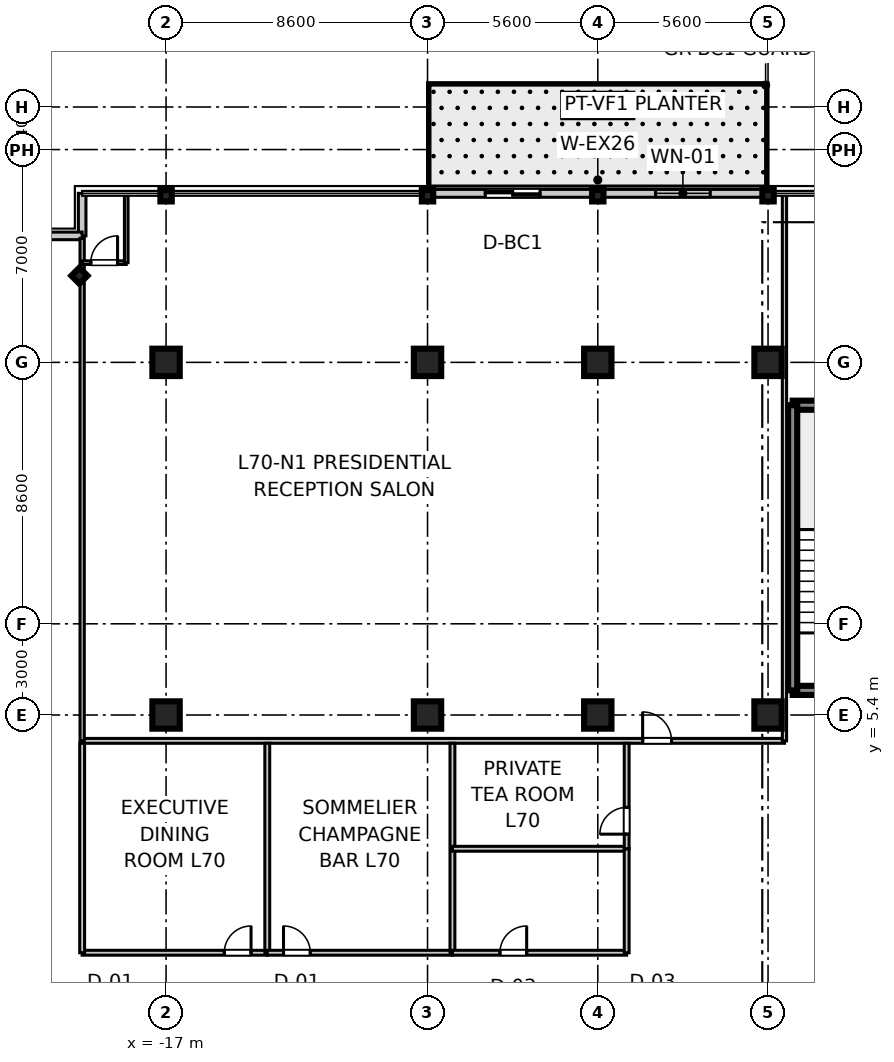
"""IFC4 building model, lengths in metres.
Left out: names, types, materials, properties, quantities, classifications, styles, units other than length and angle.
Written with IfcOpenShell. Run it as: python <this file> out.ifc"""

import sys

from ifc_helpers import new_model, si_unit, direction, frame, frame_2d, origin, origin_2d, place, context, subcontext, project, spatial, rectangle, i_section, extrude, source, transform, mapped, element, fill, save


model = new_model("IFC4")
c1 = context("Model", 3, precision=1e-05, world=origin(), true_north=direction((0.0, 1.0)))
c2 = subcontext(c1, "Body", "Model", "MODEL_VIEW")
j1 = project(units=[si_unit("LENGTHUNIT", "METRE"), si_unit("PLANEANGLEUNIT", "RADIAN")], contexts=[c1])
p1 = place(None, origin())
s1 = spatial("IfcSite", under=j1, at=p1, CompositionType="ELEMENT")
p2 = place(p1, origin())
s2 = spatial("IfcBuilding", under=s1, at=p2, CompositionType="ELEMENT")
p3 = place(p2, frame((0.0, 0.0, 273.8)))
s3 = spatial("IfcBuildingStorey", under=s2, at=p3, CompositionType="ELEMENT", Elevation=273.8)
m1 = source(origin(), c2, "Body", "SweptSolid", [
    extrude(rectangle(XDim=0.9, YDim=0.9, at=origin_2d()), origin(), (0.0, 0.0, 1.0), 3.705),
])
for number, where, z_axis, x_axis in (
    (1, (-17.0, 5.4, 0.0), (0.0, 0.0, 1.0), (1.0, 0.0, 0.0)),
    (2, (-17.0, 17.0, 0.0), (0.0, 0.0, 1.0), (1.0, 0.0, 0.0)),
    (3, (-8.4, 5.4, 0.0), (0.0, 0.0, 1.0), (1.0, 0.0, 0.0)),
    (4, (-8.4, 17.0, 0.0), (0.0, 0.0, 1.0), (1.0, 0.0, 0.0)),
    (5, (-2.8, 5.4, 0.0), (0.0, 0.0, 1.0), (1.0, 0.0, 0.0)),
    (6, (-2.8, 17.0, 0.0), (0.0, 0.0, 1.0), (1.0, 0.0, 0.0)),
    (7, (2.8, 5.4, 0.0), (0.0, 0.0, 1.0), (1.0, 0.0, 0.0)),
    (8, (2.8, 17.0, 0.0), (0.0, 0.0, 1.0), (1.0, 0.0, 0.0)),
):
    element("IfcColumn", number, at=place(p3, frame(where, z_axis=z_axis, x_axis=x_axis)), inside=s3, PredefinedType="COLUMN", context=c2, shape_type="MappedRepresentation", body=[
        mapped(m1, transform((0.0, 0.0, 0.0), scale=1.0)),
    ])
m2 = source(origin(), c2, "Body", "SweptSolid", [
    extrude(i_section(OverallWidth=0.374, OverallDepth=0.374, WebThickness=0.014, FlangeThickness=0.023, at=origin_2d()), origin(), (0.0, 0.0, 1.0), 3.705),
])
for number, where, z_axis, x_axis in (
    (9, (-17.0, 22.48, 0.0), (0.0, 0.0, 1.0), (0.0, 1.0, 0.0)),
    (10, (-8.4, 22.48, 0.0), (0.0, 0.0, 1.0), (0.0, 1.0, 0.0)),
    (11, (-2.8, 22.48, 0.0), (0.0, 0.0, 1.0), (0.0, 1.0, 0.0)),
    (12, (2.8, 22.48, 0.0), (0.0, 0.0, 1.0), (0.0, 1.0, 0.0)),
    (13, (-19.85, 19.85, 0.0), (0.0, 0.0, 1.0), (0.707, 0.707, 0.0)),
):
    element("IfcColumn", number, at=place(p3, frame(where, z_axis=z_axis, x_axis=x_axis)), inside=s3, PredefinedType="COLUMN", context=c2, shape_type="MappedRepresentation", body=[
        mapped(m2, transform((0.0, 0.0, 0.0), scale=1.0)),
    ])
m3 = source(origin(), c2, "Body", "SweptSolid", [
    extrude(rectangle(XDim=3.98, YDim=0.3, at=frame_2d((1.99, 0.0))), origin(), (0.0, 0.0, 1.0), 3.45),
])
for number, where, z_axis, x_axis in (
    (14, (3.61, 6.21, 0.0), (0.0, 0.0, 1.0), (1.0, 0.0, 0.0)),
    (15, (3.61, 15.59, 0.0), (0.0, 0.0, 1.0), (1.0, 0.0, 0.0)),
):
    element("IfcWall", number, at=place(p3, frame(where, z_axis=z_axis, x_axis=x_axis)), inside=s3, PredefinedType="SHEAR", context=c2, shape_type="MappedRepresentation", body=[
        mapped(m3, transform((0.0, 0.0, 0.0), scale=1.0)),
    ])
m4 = source(origin(), c2, "Body", "SweptSolid", [
    extrude(rectangle(XDim=9.38, YDim=0.3, at=frame_2d((4.69, 0.0))), origin(), (0.0, 0.0, 1.0), 3.45),
])
p4 = place(p3, frame((3.61, 6.21, 0.0), z_axis=(0.0, 0.0, 1.0), x_axis=(0.0, 1.0, 0.0)))
e16 = element("IfcWall", 16, at=p4, inside=s3, PredefinedType="SHEAR", context=c2, shape_type="MappedRepresentation", body=[
    mapped(m4, transform((0.0, 0.0, 0.0), scale=1.0)),
])
m5 = source(origin(), c2, "Body", "SweptSolid", [
    extrude(rectangle(XDim=1.4, YDim=0.25, at=frame_2d((0.7, 0.0))), origin(), (0.0, 0.0, 1.0), 3.45),
])
p5 = place(p3, frame((-19.76, 21.16, 0.0), z_axis=(0.0, 0.0, 1.0), x_axis=(0.0, 1.0, 0.0)))
e17 = element("IfcWall", 17, at=p5, inside=s3, PredefinedType="STANDARD", context=c2, shape_type="MappedRepresentation", body=[
    mapped(m5, transform((0.0, 0.0, 0.0), scale=1.0)),
])
m6 = source(origin(), c2, "Body", "SweptSolid", [
    extrude(rectangle(XDim=1.4, YDim=0.25, at=frame_2d((0.7, 0.0))), origin(), (0.0, 0.0, 1.0), 3.45),
])
p6 = place(p3, frame((-21.16, 21.16, 0.0), z_axis=(0.0, 0.0, 1.0), x_axis=(1.0, 0.0, 0.0)))
e18 = element("IfcWall", 18, at=p6, inside=s3, PredefinedType="STANDARD", context=c2, shape_type="MappedRepresentation", body=[
    mapped(m6, transform((0.0, 0.0, 0.0), scale=1.0)),
])
m7 = source(origin(), c2, "Body", "SweptSolid", [
    extrude(rectangle(XDim=11.2, YDim=0.26, at=frame_2d((5.6, 0.0))), origin(), (0.0, 0.0, 1.0), 2.93),
])
p7 = place(p3, frame((-8.4, 22.56, 0.0), z_axis=(0.0, 0.0, 1.0), x_axis=(1.0, 0.0, 0.0)))
e19 = element("IfcWall", 19, at=p7, inside=s3, PredefinedType="STANDARD", context=c2, shape_type="MappedRepresentation", body=[
    mapped(m7, transform((0.0, 0.0, 0.0), scale=1.0)),
])
p8 = place(p7, frame((1.9, 0.0, 0.0)))
e20 = element("IfcOpeningElement", 20, at=p8, cuts=e19, PredefinedType="OPENING", context=c2, shape_type="SweptSolid", body=[
    extrude(rectangle(XDim=1.8, YDim=2.25, at=frame_2d((0.9, 1.125))), frame((0.0, 0.14, 0.0), z_axis=(0.0, -1.0, 0.0), x_axis=(1.0, 0.0, 0.0)), (0.0, 0.0, 1.0), 0.28),
])
p9 = place(p7, frame((7.5, 0.0, 0.85)))
e21 = element("IfcOpeningElement", 21, at=p9, cuts=e19, PredefinedType="OPENING", context=c2, shape_type="SweptSolid", body=[
    extrude(rectangle(XDim=1.8, YDim=1.5, at=frame_2d((0.9, 0.75))), frame((0.0, 0.14, 0.0), z_axis=(0.0, -1.0, 0.0), x_axis=(1.0, 0.0, 0.0)), (0.0, 0.0, 1.0), 0.28),
])
m8 = source(origin(), c2, "Body", "SweptSolid", [
    extrude(rectangle(XDim=23.1, YDim=0.16, at=frame_2d((11.55, 0.0))), origin(), (0.0, 0.0, 1.0), 2.79),
])
p10 = place(p3, frame((-19.76, 4.55, 0.0), z_axis=(0.0, 0.0, 1.0), x_axis=(1.0, 0.0, 0.0)))
e22 = element("IfcWall", 22, at=p10, inside=s3, PredefinedType="PARTITIONING", context=c2, shape_type="MappedRepresentation", body=[
    mapped(m8, transform((0.0, 0.0, 0.0), scale=1.0)),
])
p11 = place(p10, frame((18.435, 0.0, 0.0)))
e23 = element("IfcOpeningElement", 23, at=p11, cuts=e22, PredefinedType="OPENING", context=c2, shape_type="SweptSolid", body=[
    extrude(rectangle(XDim=0.95, YDim=2.1, at=frame_2d((0.475, 1.05))), frame((0.0, 0.09, 0.0), z_axis=(0.0, -1.0, 0.0), x_axis=(1.0, 0.0, 0.0)), (0.0, 0.0, 1.0), 0.18),
])
m9 = source(origin(), c2, "Body", "SweptSolid", [
    extrude(rectangle(XDim=16.53, YDim=0.14, at=frame_2d((8.265, 0.0))), origin(), (0.0, 0.0, 1.0), 2.79),
])
p12 = place(p3, frame((-19.76, 4.55, 0.0), z_axis=(0.0, 0.0, 1.0), x_axis=(0.0, 1.0, 0.0)))
e24 = element("IfcWall", 24, at=p12, inside=s3, PredefinedType="PARTITIONING", context=c2, shape_type="MappedRepresentation", body=[
    mapped(m9, transform((0.0, 0.0, 0.0), scale=1.0)),
])
m10 = source(origin(), c2, "Body", "SweptSolid", [
    extrude(rectangle(XDim=17.95, YDim=0.14, at=frame_2d((8.975, 0.0))), origin(), (0.0, 0.0, 1.0), 2.79),
])
p13 = place(p3, frame((3.34, 4.55, 0.0), z_axis=(0.0, 0.0, 1.0), x_axis=(0.0, 1.0, 0.0)))
e25 = element("IfcWall", 25, at=p13, inside=s3, PredefinedType="PARTITIONING", context=c2, shape_type="MappedRepresentation", body=[
    mapped(m10, transform((0.0, 0.0, 0.0), scale=1.0)),
])
m11 = source(origin(), c2, "Body", "SweptSolid", [
    extrude(rectangle(XDim=1.45, YDim=0.12, at=frame_2d((0.725, 0.0))), origin(), (0.0, 0.0, 1.0), 2.79),
])
p14 = place(p3, frame((-19.76, 20.28, 0.0), z_axis=(0.0, 0.0, 1.0), x_axis=(1.0, 0.0, 0.0)))
e26 = element("IfcWall", 26, at=p14, inside=s3, PredefinedType="PARTITIONING", context=c2, shape_type="MappedRepresentation", body=[
    mapped(m11, transform((0.0, 0.0, 0.0), scale=1.0)),
])
p15 = place(p14, frame((0.285, 0.0, 0.0)))
e27 = element("IfcOpeningElement", 27, at=p15, cuts=e26, PredefinedType="OPENING", context=c2, shape_type="SweptSolid", body=[
    extrude(rectangle(XDim=0.88, YDim=2.1, at=frame_2d((0.44, 1.05))), frame((0.0, 0.07, 0.0), z_axis=(0.0, -1.0, 0.0), x_axis=(1.0, 0.0, 0.0)), (0.0, 0.0, 1.0), 0.14),
])
m12 = source(origin(), c2, "Body", "SweptSolid", [
    extrude(rectangle(XDim=2.22, YDim=0.12, at=frame_2d((1.11, 0.0))), origin(), (0.0, 0.0, 1.0), 2.79),
])
p16 = place(p3, frame((-18.31, 20.28, 0.0), z_axis=(0.0, 0.0, 1.0), x_axis=(0.0, 1.0, 0.0)))
e28 = element("IfcWall", 28, at=p16, inside=s3, PredefinedType="PARTITIONING", context=c2, shape_type="MappedRepresentation", body=[
    mapped(m12, transform((0.0, 0.0, 0.0), scale=1.0)),
])
m13 = source(origin(), c2, "Body", "SweptSolid", [
    extrude(rectangle(XDim=6.089, YDim=0.16, at=frame_2d((3.044, 0.0))), origin(), (0.0, 0.0, 1.0), 2.79),
])
p17 = place(p3, frame((-19.76, -2.42, 0.0), z_axis=(0.0, 0.0, 1.0), x_axis=(1.0, 0.0, 0.0)))
e29 = element("IfcWall", 29, at=p17, inside=s3, PredefinedType="PARTITIONING", context=c2, shape_type="MappedRepresentation", body=[
    mapped(m13, transform((0.0, 0.0, 0.0), scale=1.0)),
])
p18 = place(p17, frame((4.675, 0.0, 0.0)))
e30 = element("IfcOpeningElement", 30, at=p18, cuts=e29, PredefinedType="OPENING", context=c2, shape_type="SweptSolid", body=[
    extrude(rectangle(XDim=0.88, YDim=2.1, at=frame_2d((0.44, 1.05))), frame((0.0, 0.09, 0.0), z_axis=(0.0, -1.0, 0.0), x_axis=(1.0, 0.0, 0.0)), (0.0, 0.0, 1.0), 0.18),
])
m14 = source(origin(), c2, "Body", "SweptSolid", [
    extrude(rectangle(XDim=6.89, YDim=0.16, at=frame_2d((3.445, 0.0))), origin(), (0.0, 0.0, 1.0), 2.79),
])
for number, where, z_axis, x_axis in (
    (31, (-19.76, -2.42, 0.0), (0.0, 0.0, 1.0), (0.0, 1.0, 0.0)),
    (32, (-13.671, -2.42, 0.0), (0.0, 0.0, 1.0), (0.0, 1.0, 0.0)),
):
    element("IfcWall", number, at=place(p3, frame(where, z_axis=z_axis, x_axis=x_axis)), inside=s3, PredefinedType="PARTITIONING", context=c2, shape_type="MappedRepresentation", body=[
        mapped(m14, transform((0.0, 0.0, 0.0), scale=1.0)),
    ])
m15 = source(origin(), c2, "Body", "SweptSolid", [
    extrude(rectangle(XDim=6.09, YDim=0.16, at=frame_2d((3.045, 0.0))), origin(), (0.0, 0.0, 1.0), 2.79),
])
p19 = place(p3, frame((-13.671, -2.42, 0.0), z_axis=(0.0, 0.0, 1.0), x_axis=(1.0, 0.0, 0.0)))
e33 = element("IfcWall", 33, at=p19, inside=s3, PredefinedType="PARTITIONING", context=c2, shape_type="MappedRepresentation", body=[
    mapped(m15, transform((0.0, 0.0, 0.0), scale=1.0)),
])
p20 = place(p19, frame((0.534, 0.0, 0.0)))
e34 = element("IfcOpeningElement", 34, at=p20, cuts=e33, PredefinedType="OPENING", context=c2, shape_type="SweptSolid", body=[
    extrude(rectangle(XDim=0.88, YDim=2.1, at=frame_2d((0.44, 1.05))), frame((0.0, 0.09, 0.0), z_axis=(0.0, -1.0, 0.0), x_axis=(1.0, 0.0, 0.0)), (0.0, 0.0, 1.0), 0.18),
])
p21 = place(p3, frame((-7.581, -2.42, 0.0), z_axis=(0.0, 0.0, 1.0), x_axis=(0.0, 1.0, 0.0)))
e35 = element("IfcWall", 35, at=p21, inside=s3, PredefinedType="PARTITIONING", context=c2, shape_type="MappedRepresentation", body=[
    mapped(m14, transform((0.0, 0.0, 0.0), scale=1.0)),
])
m16 = source(origin(), c2, "Body", "SweptSolid", [
    extrude(rectangle(XDim=5.731, YDim=0.16, at=frame_2d((2.865, 0.0))), origin(), (0.0, 0.0, 1.0), 2.79),
])
p22 = place(p3, frame((-7.581, -2.42, 0.0), z_axis=(0.0, 0.0, 1.0), x_axis=(1.0, 0.0, 0.0)))
e36 = element("IfcWall", 36, at=p22, inside=s3, PredefinedType="PARTITIONING", context=c2, shape_type="MappedRepresentation", body=[
    mapped(m16, transform((0.0, 0.0, 0.0), scale=1.0)),
])
p23 = place(p22, frame((1.562, 0.0, 0.0)))
e37 = element("IfcOpeningElement", 37, at=p23, cuts=e36, PredefinedType="OPENING", context=c2, shape_type="SweptSolid", body=[
    extrude(rectangle(XDim=0.88, YDim=2.1, at=frame_2d((0.44, 1.05))), frame((0.0, 0.09, 0.0), z_axis=(0.0, -1.0, 0.0), x_axis=(1.0, 0.0, 0.0)), (0.0, 0.0, 1.0), 0.18),
])
p24 = place(p3, frame((-7.581, 1.0, 0.0), z_axis=(0.0, 0.0, 1.0), x_axis=(1.0, 0.0, 0.0)))
e38 = element("IfcWall", 38, at=p24, inside=s3, PredefinedType="PARTITIONING", context=c2, shape_type="MappedRepresentation", body=[
    mapped(m16, transform((0.0, 0.0, 0.0), scale=1.0)),
])
m17 = source(origin(), c2, "Body", "SweptSolid", [
    extrude(rectangle(XDim=3.42, YDim=0.16, at=frame_2d((1.71, 0.0))), origin(), (0.0, 0.0, 1.0), 2.79),
])
p25 = place(p3, frame((-1.85, -2.42, 0.0), z_axis=(0.0, 0.0, 1.0), x_axis=(0.0, 1.0, 0.0)))
e39 = element("IfcWall", 39, at=p25, inside=s3, PredefinedType="PARTITIONING", context=c2, shape_type="MappedRepresentation", body=[
    mapped(m17, transform((0.0, 0.0, 0.0), scale=1.0)),
])
m18 = source(origin(), c2, "Body", "SweptSolid", [
    extrude(rectangle(XDim=3.47, YDim=0.16, at=frame_2d((1.735, 0.0))), origin(), (0.0, 0.0, 1.0), 2.79),
])
p26 = place(p3, frame((-1.85, 1.0, 0.0), z_axis=(0.0, 0.0, 1.0), x_axis=(0.0, 1.0, 0.0)))
e40 = element("IfcWall", 40, at=p26, inside=s3, PredefinedType="PARTITIONING", context=c2, shape_type="MappedRepresentation", body=[
    mapped(m18, transform((0.0, 0.0, 0.0), scale=1.0)),
])
p27 = place(p26, frame((0.481, 0.0, 0.0)))
e41 = element("IfcOpeningElement", 41, at=p27, cuts=e40, PredefinedType="OPENING", context=c2, shape_type="SweptSolid", body=[
    extrude(rectangle(XDim=0.88, YDim=2.1, at=frame_2d((0.44, 1.05))), frame((0.0, 0.09, 0.0), z_axis=(0.0, -1.0, 0.0), x_axis=(1.0, 0.0, 0.0)), (0.0, 0.0, 1.0), 0.18),
])
m19 = source(origin(), c2, "Body", "SweptSolid", [
    extrude(rectangle(XDim=0.88, YDim=2.1, at=frame_2d((0.44, 1.05))), frame((0.0, 0.025, 0.0), z_axis=(0.0, -1.0, 0.0), x_axis=(1.0, 0.0, 0.0)), (0.0, 0.0, 1.0), 0.05),
])
p28 = place(p15, origin())
e42 = element("IfcDoor", 42, at=p28, inside=s3, OperationType="SINGLE_SWING_RIGHT", PredefinedType="DOOR", context=c2, shape_type="MappedRepresentation", body=[
    mapped(m19, transform((0.0, 0.0, 0.0), scale=1.0)),
])
fill(e27, e42)
m20 = source(origin(), c2, "Body", "SweptSolid", [
    extrude(rectangle(XDim=0.95, YDim=2.1, at=frame_2d((0.475, 1.05))), frame((0.0, 0.025, 0.0), z_axis=(0.0, -1.0, 0.0), x_axis=(1.0, 0.0, 0.0)), (0.0, 0.0, 1.0), 0.05),
])
p29 = place(p11, origin())
e43 = element("IfcDoor", 43, at=p29, inside=s3, OperationType="SINGLE_SWING_LEFT", PredefinedType="DOOR", context=c2, shape_type="MappedRepresentation", body=[
    mapped(m20, transform((0.0, 0.0, 0.0), scale=1.0)),
])
fill(e23, e43)
p30 = place(p18, origin())
e44 = element("IfcDoor", 44, at=p30, inside=s3, OperationType="SINGLE_SWING_RIGHT", PredefinedType="DOOR", context=c2, shape_type="MappedRepresentation", body=[
    mapped(m19, transform((0.0, 0.0, 0.0), scale=1.0)),
])
fill(e30, e44)
p31 = place(p20, origin())
e45 = element("IfcDoor", 45, at=p31, inside=s3, OperationType="SINGLE_SWING_LEFT", PredefinedType="DOOR", context=c2, shape_type="MappedRepresentation", body=[
    mapped(m19, transform((0.0, 0.0, 0.0), scale=1.0)),
])
fill(e34, e45)
p32 = place(p23, origin())
e46 = element("IfcDoor", 46, at=p32, inside=s3, OperationType="SINGLE_SWING_RIGHT", PredefinedType="DOOR", context=c2, shape_type="MappedRepresentation", body=[
    mapped(m19, transform((0.0, 0.0, 0.0), scale=1.0)),
])
fill(e37, e46)
p33 = place(p27, origin())
e47 = element("IfcDoor", 47, at=p33, inside=s3, OperationType="SINGLE_SWING_LEFT", PredefinedType="DOOR", context=c2, shape_type="MappedRepresentation", body=[
    mapped(m19, transform((0.0, 0.0, 0.0), scale=1.0)),
])
fill(e41, e47)
m21 = source(origin(), c2, "Body", "SweptSolid", [
    extrude(rectangle(XDim=1.8, YDim=2.25, at=frame_2d((0.9, 1.125))), frame((0.0, 0.025, 0.0), z_axis=(0.0, -1.0, 0.0), x_axis=(1.0, 0.0, 0.0)), (0.0, 0.0, 1.0), 0.05),
])
p34 = place(p8, origin())
e48 = element("IfcDoor", 48, at=p34, inside=s3, OperationType="DOUBLE_DOOR_SLIDING", PredefinedType="DOOR", context=c2, shape_type="MappedRepresentation", body=[
    mapped(m21, transform((0.0, 0.0, 0.0), scale=1.0)),
])
fill(e20, e48)
m22 = source(origin(), c2, "Body", "SweptSolid", [
    extrude(rectangle(XDim=1.8, YDim=1.5, at=frame_2d((0.9, 0.75))), frame((0.0, 0.03, 0.0), z_axis=(0.0, -1.0, 0.0), x_axis=(1.0, 0.0, 0.0)), (0.0, 0.0, 1.0), 0.06),
])
p35 = place(p9, origin())
e49 = element("IfcWindow", 49, at=p35, inside=s3, PartitioningType="SINGLE_PANEL", PredefinedType="WINDOW", context=c2, shape_type="MappedRepresentation", body=[
    mapped(m22, transform((0.0, 0.0, 0.0), scale=1.0)),
])
fill(e21, e49)
save(model, sys.argv[1])
